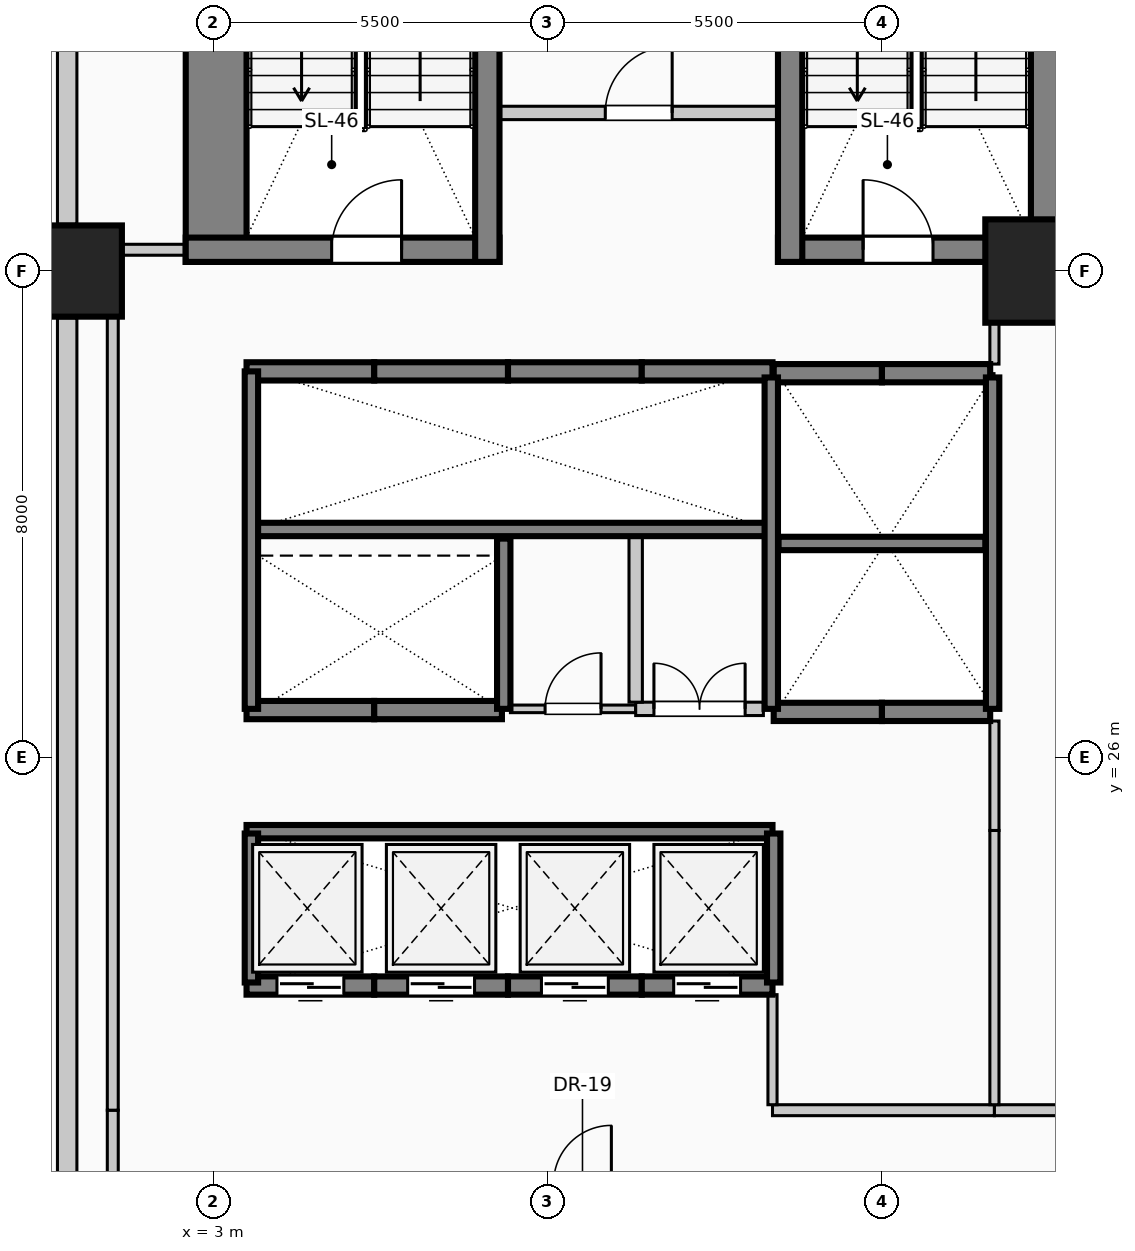
"""IFC4 building model, lengths in metres.
Left out: names, types, materials, properties, quantities, classifications, styles, units other than length and angle.
Written with IfcOpenShell. Run it as: python <this file> out.ifc"""

import sys

from ifc_helpers import new_model, si_unit, direction, frame, frame_2d, origin, origin_2d, place, context, subcontext, project, spatial, rectangle, extrude, element, fill, save


model = new_model("IFC4")
c1 = context("Model", 3, precision=1e-05, world=origin(), true_north=direction((0.0, 1.0)))
c2 = subcontext(c1, "Body", "Model", "MODEL_VIEW")
j1 = project(units=[si_unit("LENGTHUNIT", "METRE"), si_unit("PLANEANGLEUNIT", "RADIAN")], contexts=[c1])
p1 = place(None, origin())
s1 = spatial("IfcSite", under=j1, at=p1, CompositionType="ELEMENT")
p2 = place(p1, origin())
s2 = spatial("IfcBuilding", under=s1, at=p2, CompositionType="ELEMENT")
p3 = place(p2, frame((0.0, 0.0, 5.4)))
s3 = spatial("IfcBuildingStorey", under=s2, at=p3, CompositionType="ELEMENT", Elevation=5.4)
for number, where, z_axis, x_axis in (
    (1, (3.05, 34.15, 0.0), (0.0, 0.0, 1.0), (0.0, 1.0, 0.0)),
    (2, (16.95, 34.15, 0.0), (0.0, 0.0, 1.0), (0.0, 1.0, 0.0)),
):
    element("IfcWall", number, at=place(p3, frame(where, z_axis=z_axis, x_axis=x_axis)), inside=s3, PredefinedType="SHEAR", context=c2, shape_type="SweptSolid", body=[
        extrude(rectangle(XDim=9.28, YDim=1.0, at=frame_2d((4.64, 0.0))), origin(), (0.0, 0.0, 1.0), 4.05),
    ])
p4 = place(p3, frame((2.55, 34.35, 0.0), z_axis=(0.0, 0.0, 1.0), x_axis=(1.0, 0.0, 0.0)))
e3 = element("IfcWall", 3, at=p4, inside=s3, PredefinedType="SHEAR", context=c2, shape_type="SweptSolid", body=[
    extrude(rectangle(XDim=5.16, YDim=0.4, at=frame_2d((2.58, 0.0))), origin(), (0.0, 0.0, 1.0), 4.05),
])
p5 = place(p4, frame((2.4, 0.0, 0.0)))
e4 = element("IfcOpeningElement", 4, at=p5, cuts=e3, PredefinedType="OPENING", context=c2, shape_type="SweptSolid", body=[
    extrude(rectangle(XDim=1.15, YDim=2.2, at=frame_2d((0.575, 1.1))), frame((0.0, 0.21, 0.0), z_axis=(0.0, -1.0, 0.0), x_axis=(1.0, 0.0, 0.0)), (0.0, 0.0, 1.0), 0.42),
])
p6 = place(p3, frame((12.29, 34.35, 0.0), z_axis=(0.0, 0.0, 1.0), x_axis=(1.0, 0.0, 0.0)))
e5 = element("IfcWall", 5, at=p6, inside=s3, PredefinedType="SHEAR", context=c2, shape_type="SweptSolid", body=[
    extrude(rectangle(XDim=5.16, YDim=0.4, at=frame_2d((2.58, 0.0))), origin(), (0.0, 0.0, 1.0), 4.05),
])
p7 = place(p6, frame((1.4, 0.0, 0.0)))
e6 = element("IfcOpeningElement", 6, at=p7, cuts=e5, PredefinedType="OPENING", context=c2, shape_type="SweptSolid", body=[
    extrude(rectangle(XDim=1.15, YDim=2.2, at=frame_2d((0.575, 1.1))), frame((0.0, 0.21, 0.0), z_axis=(0.0, -1.0, 0.0), x_axis=(1.0, 0.0, 0.0)), (0.0, 0.0, 1.0), 0.42),
])
for number, where, z_axis, x_axis in (
    (7, (7.51, 34.15, 0.0), (0.0, 0.0, 1.0), (0.0, 1.0, 0.0)),
    (8, (12.49, 34.15, 0.0), (0.0, 0.0, 1.0), (0.0, 1.0, 0.0)),
):
    element("IfcWall", number, at=place(p3, frame(where, z_axis=z_axis, x_axis=x_axis)), inside=s3, PredefinedType="SHEAR", context=c2, shape_type="SweptSolid", body=[
        extrude(rectangle(XDim=9.28, YDim=0.4, at=frame_2d((4.64, 0.0))), origin(), (0.0, 0.0, 1.0), 4.05),
    ])
p8 = place(p3, frame((0.6, 34.0, 0.0), z_axis=(0.0, 0.0, 1.0), x_axis=(0.0, 1.0, 0.0)))
e9 = element("IfcColumn", 9, at=p8, inside=s3, PredefinedType="COLUMN", context=c2, shape_type="SweptSolid", body=[
    extrude(rectangle(XDim=1.5, YDim=1.8, at=origin_2d()), origin(), (0.0, 0.0, 1.0), 4.05),
])
p9 = place(p3, frame((16.4, 34.0, 0.0), z_axis=(0.0, 0.0, 1.0), x_axis=(1.0, 0.0, 0.0)))
e10 = element("IfcColumn", 10, at=p9, inside=s3, PredefinedType="COLUMN", context=c2, shape_type="SweptSolid", body=[
    extrude(rectangle(XDim=1.4, YDim=1.7, at=origin_2d()), origin(), (0.0, 0.0, 1.0), 4.05),
])
p10 = place(p3, frame((0.6, 18.77, 0.0), z_axis=(0.0, 0.0, 1.0), x_axis=(0.0, 1.0, 0.0)))
e11 = element("IfcWall", 11, at=p10, inside=s3, PredefinedType="SOLIDWALL", context=c2, shape_type="SweptSolid", body=[
    extrude(rectangle(XDim=14.46, YDim=0.32, at=frame_2d((7.23, 0.0))), origin(), (0.0, 0.0, 1.0), 2.7),
])
p11 = place(p3, frame((0.6, 34.77, 0.0), z_axis=(0.0, 0.0, 1.0), x_axis=(0.0, 1.0, 0.0)))
e12 = element("IfcWall", 12, at=p11, inside=s3, PredefinedType="SOLIDWALL", context=c2, shape_type="SweptSolid", body=[
    extrude(rectangle(XDim=6.86, YDim=0.32, at=frame_2d((3.43, 0.0))), origin(), (0.0, 0.0, 1.0), 2.7),
])
p12 = place(p3, frame((5.65, 22.25, 0.0), z_axis=(0.0, 0.0, 1.0), x_axis=(-1.0, 0.0, 0.0)))
e13 = element("IfcWall", 13, at=p12, inside=s3, PredefinedType="SOLIDWALL", context=c2, shape_type="SweptSolid", body=[
    extrude(rectangle(XDim=2.1, YDim=0.3, at=frame_2d((1.05, 0.0))), origin(), (0.0, 0.0, 1.0), 4.05),
])
p13 = place(p12, frame((0.5, 0.0, 0.0)))
e14 = element("IfcOpeningElement", 14, at=p13, cuts=e13, PredefinedType="OPENING", context=c2, shape_type="SweptSolid", body=[
    extrude(rectangle(XDim=1.1, YDim=2.2, at=frame_2d((0.55, 1.1))), frame((0.0, 0.16, 0.0), z_axis=(0.0, -1.0, 0.0), x_axis=(1.0, 0.0, 0.0)), (0.0, 0.0, 1.0), 0.32),
])
p14 = place(p3, frame((7.85, 22.25, 0.0), z_axis=(0.0, 0.0, 1.0), x_axis=(-1.0, 0.0, 0.0)))
e15 = element("IfcWall", 15, at=p14, inside=s3, PredefinedType="SOLIDWALL", context=c2, shape_type="SweptSolid", body=[
    extrude(rectangle(XDim=2.2, YDim=0.3, at=frame_2d((1.1, 0.0))), origin(), (0.0, 0.0, 1.0), 4.05),
])
p15 = place(p14, frame((0.55, 0.0, 0.0)))
e16 = element("IfcOpeningElement", 16, at=p15, cuts=e15, PredefinedType="OPENING", context=c2, shape_type="SweptSolid", body=[
    extrude(rectangle(XDim=1.1, YDim=2.2, at=frame_2d((0.55, 1.1))), frame((0.0, 0.16, 0.0), z_axis=(0.0, -1.0, 0.0), x_axis=(1.0, 0.0, 0.0)), (0.0, 0.0, 1.0), 0.32),
])
p16 = place(p3, frame((10.05, 22.25, 0.0), z_axis=(0.0, 0.0, 1.0), x_axis=(-1.0, 0.0, 0.0)))
e17 = element("IfcWall", 17, at=p16, inside=s3, PredefinedType="SOLIDWALL", context=c2, shape_type="SweptSolid", body=[
    extrude(rectangle(XDim=2.2, YDim=0.3, at=frame_2d((1.1, 0.0))), origin(), (0.0, 0.0, 1.0), 4.05),
])
p17 = place(p16, frame((0.55, 0.0, 0.0)))
e18 = element("IfcOpeningElement", 18, at=p17, cuts=e17, PredefinedType="OPENING", context=c2, shape_type="SweptSolid", body=[
    extrude(rectangle(XDim=1.1, YDim=2.2, at=frame_2d((0.55, 1.1))), frame((0.0, 0.16, 0.0), z_axis=(0.0, -1.0, 0.0), x_axis=(1.0, 0.0, 0.0)), (0.0, 0.0, 1.0), 0.32),
])
p18 = place(p3, frame((12.2, 22.25, 0.0), z_axis=(0.0, 0.0, 1.0), x_axis=(-1.0, 0.0, 0.0)))
e19 = element("IfcWall", 19, at=p18, inside=s3, PredefinedType="SOLIDWALL", context=c2, shape_type="SweptSolid", body=[
    extrude(rectangle(XDim=2.15, YDim=0.3, at=frame_2d((1.075, 0.0))), origin(), (0.0, 0.0, 1.0), 4.05),
])
p19 = place(p18, frame((0.525, 0.0, 0.0)))
e20 = element("IfcOpeningElement", 20, at=p19, cuts=e19, PredefinedType="OPENING", context=c2, shape_type="SweptSolid", body=[
    extrude(rectangle(XDim=1.1, YDim=2.2, at=frame_2d((0.55, 1.1))), frame((0.0, 0.16, 0.0), z_axis=(0.0, -1.0, 0.0), x_axis=(1.0, 0.0, 0.0)), (0.0, 0.0, 1.0), 0.32),
])
for number, where, z_axis, x_axis in (
    (21, (14.0, 26.75, 0.0), (0.0, 0.0, 1.0), (-1.0, 0.0, 0.0)),
    (22, (15.78, 26.75, 0.0), (0.0, 0.0, 1.0), (-1.0, 0.0, 0.0)),
    (23, (12.22, 32.32, 0.0), (0.0, 0.0, 1.0), (1.0, 0.0, 0.0)),
    (24, (14.0, 32.32, 0.0), (0.0, 0.0, 1.0), (1.0, 0.0, 0.0)),
):
    element("IfcWall", number, at=place(p3, frame(where, z_axis=z_axis, x_axis=x_axis)), inside=s3, PredefinedType="SOLIDWALL", context=c2, shape_type="SweptSolid", body=[
        extrude(rectangle(XDim=1.78, YDim=0.3, at=frame_2d((0.89, 0.0))), origin(), (0.0, 0.0, 1.0), 4.05),
    ])
p20 = place(p3, frame((3.55, 32.35, 0.0), z_axis=(0.0, 0.0, 1.0), x_axis=(1.0, 0.0, 0.0)))
e25 = element("IfcWall", 25, at=p20, inside=s3, PredefinedType="SOLIDWALL", context=c2, shape_type="SweptSolid", body=[
    extrude(rectangle(XDim=2.1, YDim=0.3, at=frame_2d((1.05, 0.0))), origin(), (0.0, 0.0, 1.0), 4.05),
])
p21 = place(p3, frame((5.65, 32.35, 0.0), z_axis=(0.0, 0.0, 1.0), x_axis=(1.0, 0.0, 0.0)))
e26 = element("IfcWall", 26, at=p21, inside=s3, PredefinedType="SOLIDWALL", context=c2, shape_type="SweptSolid", body=[
    extrude(rectangle(XDim=2.2, YDim=0.3, at=frame_2d((1.1, 0.0))), origin(), (0.0, 0.0, 1.0), 4.05),
])
p22 = place(p3, frame((7.85, 32.35, 0.0), z_axis=(0.0, 0.0, 1.0), x_axis=(1.0, 0.0, 0.0)))
e27 = element("IfcWall", 27, at=p22, inside=s3, PredefinedType="SOLIDWALL", context=c2, shape_type="SweptSolid", body=[
    extrude(rectangle(XDim=2.2, YDim=0.3, at=frame_2d((1.1, 0.0))), origin(), (0.0, 0.0, 1.0), 4.05),
])
p23 = place(p3, frame((10.05, 32.35, 0.0), z_axis=(0.0, 0.0, 1.0), x_axis=(1.0, 0.0, 0.0)))
e28 = element("IfcWall", 28, at=p23, inside=s3, PredefinedType="SOLIDWALL", context=c2, shape_type="SweptSolid", body=[
    extrude(rectangle(XDim=2.15, YDim=0.3, at=frame_2d((1.075, 0.0))), origin(), (0.0, 0.0, 1.0), 4.05),
])
p24 = place(p3, frame((5.65, 26.78, 0.0), z_axis=(0.0, 0.0, 1.0), x_axis=(-1.0, 0.0, 0.0)))
e29 = element("IfcWall", 29, at=p24, inside=s3, PredefinedType="SOLIDWALL", context=c2, shape_type="SweptSolid", body=[
    extrude(rectangle(XDim=2.1, YDim=0.3, at=frame_2d((1.05, 0.0))), origin(), (0.0, 0.0, 1.0), 4.05),
])
p25 = place(p3, frame((7.75, 26.78, 0.0), z_axis=(0.0, 0.0, 1.0), x_axis=(-1.0, 0.0, 0.0)))
e30 = element("IfcWall", 30, at=p25, inside=s3, PredefinedType="SOLIDWALL", context=c2, shape_type="SweptSolid", body=[
    extrude(rectangle(XDim=2.1, YDim=0.3, at=frame_2d((1.05, 0.0))), origin(), (0.0, 0.0, 1.0), 4.05),
])
p26 = place(p3, frame((3.55, 29.75, 0.0), z_axis=(0.0, 0.0, 1.0), x_axis=(1.0, 0.0, 0.0)))
e31 = element("IfcWall", 31, at=p26, inside=s3, PredefinedType="SOLIDWALL", context=c2, shape_type="SweptSolid", body=[
    extrude(rectangle(XDim=8.65, YDim=0.22, at=frame_2d((4.325, 0.0))), origin(), (0.0, 0.0, 1.0), 4.05),
])
p27 = place(p3, frame((3.63, 26.8, 0.0), z_axis=(0.0, 0.0, 1.0), x_axis=(0.0, 1.0, 0.0)))
e32 = element("IfcWall", 32, at=p27, inside=s3, PredefinedType="SOLIDWALL", context=c2, shape_type="SweptSolid", body=[
    extrude(rectangle(XDim=5.55, YDim=0.22, at=frame_2d((2.775, 0.0))), origin(), (0.0, 0.0, 1.0), 4.05),
])
p28 = place(p3, frame((7.78, 26.8, 0.0), z_axis=(0.0, 0.0, 1.0), x_axis=(0.0, 1.0, 0.0)))
e33 = element("IfcWall", 33, at=p28, inside=s3, PredefinedType="SOLIDWALL", context=c2, shape_type="SweptSolid", body=[
    extrude(rectangle(XDim=2.8, YDim=0.22, at=frame_2d((1.4, 0.0))), origin(), (0.0, 0.0, 1.0), 4.05),
])
for number, where, z_axis, x_axis in (
    (34, (12.18, 26.8, 0.0), (0.0, 0.0, 1.0), (0.0, 1.0, 0.0)),
    (35, (15.82, 26.8, 0.0), (0.0, 0.0, 1.0), (0.0, 1.0, 0.0)),
):
    element("IfcWall", number, at=place(p3, frame(where, z_axis=z_axis, x_axis=x_axis)), inside=s3, PredefinedType="SOLIDWALL", context=c2, shape_type="SweptSolid", body=[
        extrude(rectangle(XDim=5.45, YDim=0.22, at=frame_2d((2.725, 0.0))), origin(), (0.0, 0.0, 1.0), 4.05),
    ])
p29 = place(p3, frame((12.3, 29.52, 0.0), z_axis=(0.0, 0.0, 1.0), x_axis=(1.0, 0.0, 0.0)))
e36 = element("IfcWall", 36, at=p29, inside=s3, PredefinedType="SOLIDWALL", context=c2, shape_type="SweptSolid", body=[
    extrude(rectangle(XDim=3.4, YDim=0.22, at=frame_2d((1.7, 0.0))), origin(), (0.0, 0.0, 1.0), 4.05),
])
p30 = place(p3, frame((3.55, 24.78, 0.0), z_axis=(0.0, 0.0, 1.0), x_axis=(1.0, 0.0, 0.0)))
e37 = element("IfcWall", 37, at=p30, inside=s3, PredefinedType="SOLIDWALL", context=c2, shape_type="SweptSolid", body=[
    extrude(rectangle(XDim=8.65, YDim=0.22, at=frame_2d((4.325, 0.0))), origin(), (0.0, 0.0, 1.0), 4.05),
])
for number, where, z_axis, x_axis in (
    (38, (3.63, 22.3, 0.0), (0.0, 0.0, 1.0), (0.0, 1.0, 0.0)),
    (39, (12.22, 22.3, 0.0), (0.0, 0.0, 1.0), (0.0, 1.0, 0.0)),
):
    element("IfcWall", number, at=place(p3, frame(where, z_axis=z_axis, x_axis=x_axis)), inside=s3, PredefinedType="SOLIDWALL", context=c2, shape_type="SweptSolid", body=[
        extrude(rectangle(XDim=2.45, YDim=0.22, at=frame_2d((1.225, 0.0))), origin(), (0.0, 0.0, 1.0), 4.05),
    ])
p31 = place(p3, frame((7.51, 36.6, 0.0), z_axis=(0.0, 0.0, 1.0), x_axis=(1.0, 0.0, 0.0)))
e40 = element("IfcWall", 40, at=p31, inside=s3, PredefinedType="PARTITIONING", context=c2, shape_type="SweptSolid", body=[
    extrude(rectangle(XDim=4.98, YDim=0.22, at=frame_2d((2.49, 0.0))), origin(), (0.0, 0.0, 1.0), 3.65),
])
p32 = place(p31, frame((1.94, 0.0, 0.0)))
e41 = element("IfcOpeningElement", 41, at=p32, cuts=e40, PredefinedType="OPENING", context=c2, shape_type="SweptSolid", body=[
    extrude(rectangle(XDim=1.1, YDim=2.2, at=frame_2d((0.55, 1.1))), frame((0.0, 0.12, 0.0), z_axis=(0.0, -1.0, 0.0), x_axis=(1.0, 0.0, 0.0)), (0.0, 0.0, 1.0), 0.24),
])
p33 = place(p3, frame((12.2, 20.2, 0.0), z_axis=(0.0, 0.0, 1.0), x_axis=(1.0, 0.0, 0.0)))
e42 = element("IfcWall", 42, at=p33, inside=s3, PredefinedType="PARTITIONING", context=c2, shape_type="SweptSolid", body=[
    extrude(rectangle(XDim=3.65, YDim=0.18, at=frame_2d((1.825, 0.0))), origin(), (0.0, 0.0, 1.0), 3.65),
])
p34 = place(p3, frame((15.85, 20.2, 0.0), z_axis=(0.0, 0.0, 1.0), x_axis=(1.0, 0.0, 0.0)))
e43 = element("IfcWall", 43, at=p34, inside=s3, PredefinedType="PARTITIONING", context=c2, shape_type="SweptSolid", body=[
    extrude(rectangle(XDim=12.65, YDim=0.18, at=frame_2d((6.325, 0.0))), origin(), (0.0, 0.0, 1.0), 3.65),
])
p35 = place(p34, frame((5.85, 0.0, 0.0)))
e44 = element("IfcOpeningElement", 44, at=p35, cuts=e43, PredefinedType="OPENING", context=c2, shape_type="SweptSolid", body=[
    extrude(rectangle(XDim=0.95, YDim=2.15, at=frame_2d((0.475, 1.075))), frame((0.0, 0.1, 0.0), z_axis=(0.0, -1.0, 0.0), x_axis=(1.0, 0.0, 0.0)), (0.0, 0.0, 1.0), 0.2),
])
p36 = place(p3, frame((7.89, 26.8, 0.0), z_axis=(0.0, 0.0, 1.0), x_axis=(1.0, 0.0, 0.0)))
e45 = element("IfcWall", 45, at=p36, inside=s3, PredefinedType="PARTITIONING", context=c2, shape_type="SweptSolid", body=[
    extrude(rectangle(XDim=2.06, YDim=0.125, at=frame_2d((1.03, 0.0))), origin(), (0.0, 0.0, 1.0), 3.65),
])
p37 = place(p36, frame((0.57, 0.0, 0.0)))
e46 = element("IfcOpeningElement", 46, at=p37, cuts=e45, PredefinedType="OPENING", context=c2, shape_type="SweptSolid", body=[
    extrude(rectangle(XDim=0.92, YDim=2.1, at=frame_2d((0.46, 1.05))), frame((0.0, 0.073, 0.0), z_axis=(0.0, -1.0, 0.0), x_axis=(1.0, 0.0, 0.0)), (0.0, 0.0, 1.0), 0.145),
])
p38 = place(p3, frame((9.95, 26.8, 0.0), z_axis=(0.0, 0.0, 1.0), x_axis=(1.0, 0.0, 0.0)))
e47 = element("IfcWall", 47, at=p38, inside=s3, PredefinedType="PARTITIONING", context=c2, shape_type="SweptSolid", body=[
    extrude(rectangle(XDim=2.1, YDim=0.22, at=frame_2d((1.05, 0.0))), origin(), (0.0, 0.0, 1.0), 3.65),
])
p39 = place(p38, frame((0.3, 0.0, 0.0)))
e48 = element("IfcOpeningElement", 48, at=p39, cuts=e47, PredefinedType="OPENING", context=c2, shape_type="SweptSolid", body=[
    extrude(rectangle(XDim=1.5, YDim=2.25, at=frame_2d((0.75, 1.125))), frame((0.0, 0.12, 0.0), z_axis=(0.0, -1.0, 0.0), x_axis=(1.0, 0.0, 0.0)), (0.0, 0.0, 1.0), 0.24),
])
p40 = place(p3, frame((1.5, 34.35, 0.0), z_axis=(0.0, 0.0, 1.0), x_axis=(1.0, 0.0, 0.0)))
e49 = element("IfcWall", 49, at=p40, inside=s3, PredefinedType="PARTITIONING", context=c2, shape_type="SweptSolid", body=[
    extrude(rectangle(XDim=1.05, YDim=0.18, at=frame_2d((0.525, 0.0))), origin(), (0.0, 0.0, 1.0), 2.695),
])
p41 = place(p3, frame((1.35, 19.09, 0.0), z_axis=(0.0, 0.0, 1.0), x_axis=(0.0, 1.0, 0.0)))
e50 = element("IfcWall", 50, at=p41, inside=s3, PredefinedType="PARTITIONING", context=c2, shape_type="SweptSolid", body=[
    extrude(rectangle(XDim=1.11, YDim=0.18, at=frame_2d((0.555, 0.0))), origin(), (0.0, 0.0, 1.0), 3.65),
])
p42 = place(p3, frame((1.35, 20.2, 0.0), z_axis=(0.0, 0.0, 1.0), x_axis=(0.0, 1.0, 0.0)))
e51 = element("IfcWall", 51, at=p42, inside=s3, PredefinedType="PARTITIONING", context=c2, shape_type="SweptSolid", body=[
    extrude(rectangle(XDim=13.05, YDim=0.18, at=frame_2d((6.525, 0.0))), origin(), (0.0, 0.0, 1.0), 3.65),
])
p43 = place(p3, frame((9.95, 26.91, 0.0), z_axis=(0.0, 0.0, 1.0), x_axis=(0.0, 1.0, 0.0)))
e52 = element("IfcWall", 52, at=p43, inside=s3, PredefinedType="PARTITIONING", context=c2, shape_type="SweptSolid", body=[
    extrude(rectangle(XDim=2.73, YDim=0.22, at=frame_2d((1.365, 0.0))), origin(), (0.0, 0.0, 1.0), 3.65),
])
p44 = place(p3, frame((12.2, 20.29, 0.0), z_axis=(0.0, 0.0, 1.0), x_axis=(0.0, 1.0, 0.0)))
e53 = element("IfcWall", 53, at=p44, inside=s3, PredefinedType="PARTITIONING", context=c2, shape_type="SweptSolid", body=[
    extrude(rectangle(XDim=1.81, YDim=0.15, at=frame_2d((0.905, 0.0))), origin(), (0.0, 0.0, 1.0), 3.65),
])
p45 = place(p3, frame((15.85, 20.29, 0.0), z_axis=(0.0, 0.0, 1.0), x_axis=(0.0, 1.0, 0.0)))
e54 = element("IfcWall", 54, at=p45, inside=s3, PredefinedType="PARTITIONING", context=c2, shape_type="SweptSolid", body=[
    extrude(rectangle(XDim=4.51, YDim=0.15, at=frame_2d((2.255, 0.0))), origin(), (0.0, 0.0, 1.0), 3.65),
])
p46 = place(p3, frame((15.85, 24.8, 0.0), z_axis=(0.0, 0.0, 1.0), x_axis=(0.0, 1.0, 0.0)))
e55 = element("IfcWall", 55, at=p46, inside=s3, PredefinedType="PARTITIONING", context=c2, shape_type="SweptSolid", body=[
    extrude(rectangle(XDim=1.8, YDim=0.15, at=frame_2d((0.9, 0.0))), origin(), (0.0, 0.0, 1.0), 3.65),
])
p47 = place(p3, frame((15.85, 32.47, 0.0), z_axis=(0.0, 0.0, 1.0), x_axis=(0.0, 1.0, 0.0)))
e56 = element("IfcWall", 56, at=p47, inside=s3, PredefinedType="PARTITIONING", context=c2, shape_type="SweptSolid", body=[
    extrude(rectangle(XDim=0.68, YDim=0.15, at=frame_2d((0.34, 0.0))), origin(), (0.0, 0.0, 1.0), 3.65),
])
p48 = place(p13, origin())
e57 = element("IfcDoor", 57, at=p48, inside=s3, OperationType="SLIDING_TO_LEFT", PredefinedType="DOOR", context=c2, shape_type="SweptSolid", body=[
    extrude(rectangle(XDim=1.1, YDim=2.2, at=frame_2d((0.55, 1.1))), frame((0.0, 0.025, 0.0), z_axis=(0.0, -1.0, 0.0), x_axis=(1.0, 0.0, 0.0)), (0.0, 0.0, 1.0), 0.05),
])
fill(e14, e57)
p49 = place(p15, origin())
e58 = element("IfcDoor", 58, at=p49, inside=s3, OperationType="SLIDING_TO_RIGHT", PredefinedType="DOOR", context=c2, shape_type="SweptSolid", body=[
    extrude(rectangle(XDim=1.1, YDim=2.2, at=frame_2d((0.55, 1.1))), frame((0.0, 0.025, 0.0), z_axis=(0.0, -1.0, 0.0), x_axis=(1.0, 0.0, 0.0)), (0.0, 0.0, 1.0), 0.05),
])
fill(e16, e58)
p50 = place(p17, origin())
e59 = element("IfcDoor", 59, at=p50, inside=s3, OperationType="SLIDING_TO_LEFT", PredefinedType="DOOR", context=c2, shape_type="SweptSolid", body=[
    extrude(rectangle(XDim=1.1, YDim=2.2, at=frame_2d((0.55, 1.1))), frame((0.0, 0.025, 0.0), z_axis=(0.0, -1.0, 0.0), x_axis=(1.0, 0.0, 0.0)), (0.0, 0.0, 1.0), 0.05),
])
fill(e18, e59)
p51 = place(p19, origin())
e60 = element("IfcDoor", 60, at=p51, inside=s3, OperationType="SLIDING_TO_RIGHT", PredefinedType="DOOR", context=c2, shape_type="SweptSolid", body=[
    extrude(rectangle(XDim=1.1, YDim=2.2, at=frame_2d((0.55, 1.1))), frame((0.0, 0.025, 0.0), z_axis=(0.0, -1.0, 0.0), x_axis=(1.0, 0.0, 0.0)), (0.0, 0.0, 1.0), 0.05),
])
fill(e20, e60)
p52 = place(p5, origin())
e61 = element("IfcDoor", 61, at=p52, inside=s3, OperationType="SINGLE_SWING_RIGHT", PredefinedType="DOOR", context=c2, shape_type="SweptSolid", body=[
    extrude(rectangle(XDim=1.15, YDim=2.2, at=frame_2d((0.575, 1.1))), frame((0.0, 0.025, 0.0), z_axis=(0.0, -1.0, 0.0), x_axis=(1.0, 0.0, 0.0)), (0.0, 0.0, 1.0), 0.05),
])
fill(e4, e61)
p53 = place(p7, origin())
e62 = element("IfcDoor", 62, at=p53, inside=s3, OperationType="SINGLE_SWING_LEFT", PredefinedType="DOOR", context=c2, shape_type="SweptSolid", body=[
    extrude(rectangle(XDim=1.15, YDim=2.2, at=frame_2d((0.575, 1.1))), frame((0.0, 0.025, 0.0), z_axis=(0.0, -1.0, 0.0), x_axis=(1.0, 0.0, 0.0)), (0.0, 0.0, 1.0), 0.05),
])
fill(e6, e62)
p54 = place(p32, origin())
e63 = element("IfcDoor", 63, at=p54, inside=s3, OperationType="SINGLE_SWING_RIGHT", PredefinedType="DOOR", context=c2, shape_type="SweptSolid", body=[
    extrude(rectangle(XDim=1.1, YDim=2.2, at=frame_2d((0.55, 1.1))), frame((0.0, 0.025, 0.0), z_axis=(0.0, -1.0, 0.0), x_axis=(1.0, 0.0, 0.0)), (0.0, 0.0, 1.0), 0.05),
])
fill(e41, e63)
p55 = place(p37, origin())
e64 = element("IfcDoor", 64, at=p55, inside=s3, OperationType="SINGLE_SWING_RIGHT", PredefinedType="DOOR", context=c2, shape_type="SweptSolid", body=[
    extrude(rectangle(XDim=0.92, YDim=2.1, at=frame_2d((0.46, 1.05))), frame((0.0, 0.025, 0.0), z_axis=(0.0, -1.0, 0.0), x_axis=(1.0, 0.0, 0.0)), (0.0, 0.0, 1.0), 0.05),
])
fill(e46, e64)
p56 = place(p39, origin())
e65 = element("IfcDoor", 65, at=p56, inside=s3, OperationType="DOUBLE_DOOR_SINGLE_SWING", PredefinedType="DOOR", context=c2, shape_type="SweptSolid", body=[
    extrude(rectangle(XDim=1.5, YDim=2.25, at=frame_2d((0.75, 1.125))), frame((0.0, 0.025, 0.0), z_axis=(0.0, -1.0, 0.0), x_axis=(1.0, 0.0, 0.0)), (0.0, 0.0, 1.0), 0.05),
])
fill(e48, e65)
save(model, sys.argv[1])
